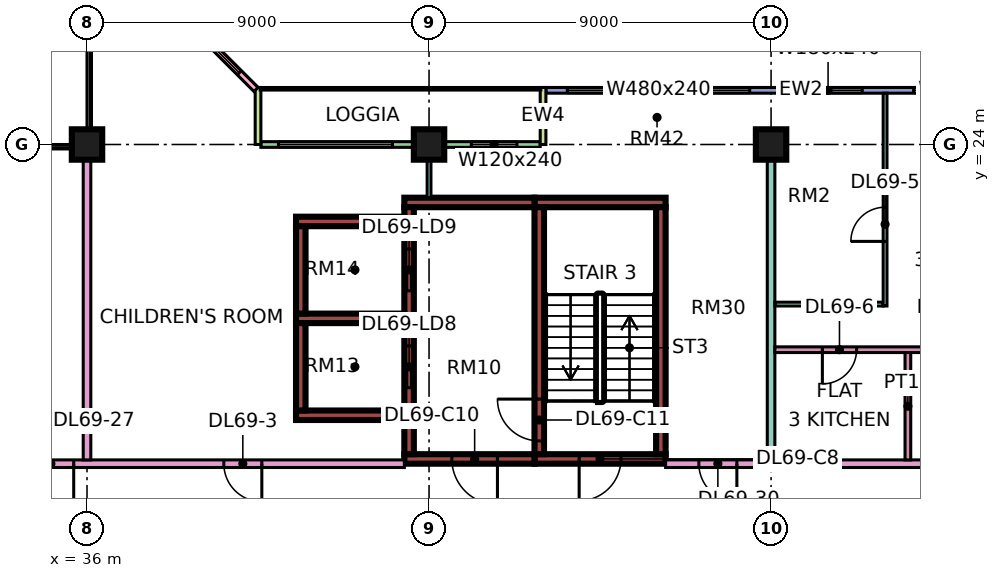
"""IFC4 building model, lengths in metres.
Left out: names, types, materials, properties, quantities, classifications, styles, units other than length and angle.
Written with IfcOpenShell. Run it as: python <this file> out.ifc"""

import sys

from ifc_helpers import new_model, si_unit, direction, frame, frame_2d, origin, origin_2d, place, context, subcontext, project, spatial, rectangle, extrude, element, fill, save


model = new_model("IFC4")
c1 = context("Model", 3, precision=1e-05, world=origin(), true_north=direction((0.0, 1.0)))
c2 = subcontext(c1, "Body", "Model", "MODEL_VIEW")
j1 = project(units=[si_unit("LENGTHUNIT", "METRE"), si_unit("PLANEANGLEUNIT", "RADIAN")], contexts=[c1])
p1 = place(None, origin())
s1 = spatial("IfcSite", under=j1, at=p1, CompositionType="ELEMENT")
p2 = place(p1, origin())
s2 = spatial("IfcBuilding", under=s1, at=p2, CompositionType="ELEMENT")
p3 = place(p2, frame((0.0, 0.0, 295.9)))
s3 = spatial("IfcBuildingStorey", under=s2, at=p3, CompositionType="ELEMENT", Elevation=295.9)
for number, where, z_axis, x_axis in (
    (1, (36.0, 24.0, 0.0), (0.0, 0.0, 1.0), (1.0, 0.0, 0.0)),
    (2, (45.0, 24.0, 0.0), (0.0, 0.0, 1.0), (1.0, 0.0, 0.0)),
    (3, (54.0, 24.0, 0.0), (0.0, 0.0, 1.0), (1.0, 0.0, 0.0)),
):
    element("IfcColumn", number, at=place(p3, frame(where, z_axis=z_axis, x_axis=x_axis)), inside=s3, PredefinedType="COLUMN", context=c2, shape_type="SweptSolid", body=[
        extrude(rectangle(XDim=0.8, YDim=0.8, at=origin_2d()), origin(), (0.0, 0.0, 1.0), 3.75),
    ])
p4 = place(p3, frame((47.775, 15.725, 0.0), z_axis=(0.0, 0.0, 1.0), x_axis=(1.0, 0.0, 0.0)))
e4 = element("IfcWall", 4, at=p4, inside=s3, PredefinedType="SHEAR", context=c2, shape_type="SweptSolid", body=[
    extrude(rectangle(XDim=3.45, YDim=0.25, at=frame_2d((1.725, 0.0))), origin(), (0.0, 0.0, 1.0), 3.75),
])
p5 = place(p4, frame((1.175, 0.0, 0.0)))
e5 = element("IfcOpeningElement", 5, at=p5, cuts=e4, PredefinedType="OPENING", context=c2, shape_type="SweptSolid", body=[
    extrude(rectangle(XDim=1.1, YDim=2.2, at=frame_2d((0.55, 1.1))), frame((0.0, 0.135, 0.0), z_axis=(0.0, -1.0, 0.0), x_axis=(1.0, 0.0, 0.0)), (0.0, 0.0, 1.0), 0.27),
])
p6 = place(p3, frame((47.775, 22.475, 0.0), z_axis=(0.0, 0.0, 1.0), x_axis=(1.0, 0.0, 0.0)))
e6 = element("IfcWall", 6, at=p6, inside=s3, PredefinedType="SHEAR", context=c2, shape_type="SweptSolid", body=[
    extrude(rectangle(XDim=3.45, YDim=0.25, at=frame_2d((1.725, 0.0))), origin(), (0.0, 0.0, 1.0), 3.75),
])
p7 = place(p3, frame((47.9, 15.85, 0.0), z_axis=(0.0, 0.0, 1.0), x_axis=(0.0, 1.0, 0.0)))
e7 = element("IfcWall", 7, at=p7, inside=s3, PredefinedType="SHEAR", context=c2, shape_type="SweptSolid", body=[
    extrude(rectangle(XDim=6.5, YDim=0.25, at=frame_2d((3.25, 0.0))), origin(), (0.0, 0.0, 1.0), 3.75),
])
p8 = place(p7, frame((0.35, 0.0, 0.0)))
e8 = element("IfcOpeningElement", 8, at=p8, cuts=e7, PredefinedType="OPENING", context=c2, shape_type="SweptSolid", body=[
    extrude(rectangle(XDim=1.1, YDim=2.2, at=frame_2d((0.55, 1.1))), frame((0.0, 0.135, 0.0), z_axis=(0.0, -1.0, 0.0), x_axis=(1.0, 0.0, 0.0)), (0.0, 0.0, 1.0), 0.27),
])
p9 = place(p3, frame((51.1, 15.85, 0.0), z_axis=(0.0, 0.0, 1.0), x_axis=(0.0, 1.0, 0.0)))
e9 = element("IfcWall", 9, at=p9, inside=s3, PredefinedType="SHEAR", context=c2, shape_type="SweptSolid", body=[
    extrude(rectangle(XDim=6.5, YDim=0.25, at=frame_2d((3.25, 0.0))), origin(), (0.0, 0.0, 1.0), 3.75),
])
p10 = place(p3, frame((44.35, 15.725, 0.0), z_axis=(0.0, 0.0, 1.0), x_axis=(1.0, 0.0, 0.0)))
e10 = element("IfcWall", 10, at=p10, inside=s3, PredefinedType="SHEAR", context=c2, shape_type="SweptSolid", body=[
    extrude(rectangle(XDim=3.425, YDim=0.25, at=frame_2d((1.712, 0.0))), origin(), (0.0, 0.0, 1.0), 3.75),
])
p11 = place(p10, frame((1.25, 0.0, 0.0)))
e11 = element("IfcOpeningElement", 11, at=p11, cuts=e10, PredefinedType="OPENING", context=c2, shape_type="SweptSolid", body=[
    extrude(rectangle(XDim=1.2, YDim=2.2, at=frame_2d((0.6, 1.1))), frame((0.0, 0.135, 0.0), z_axis=(0.0, -1.0, 0.0), x_axis=(1.0, 0.0, 0.0)), (0.0, 0.0, 1.0), 0.27),
])
p12 = place(p3, frame((44.35, 22.475, 0.0), z_axis=(0.0, 0.0, 1.0), x_axis=(1.0, 0.0, 0.0)))
e12 = element("IfcWall", 12, at=p12, inside=s3, PredefinedType="SHEAR", context=c2, shape_type="SweptSolid", body=[
    extrude(rectangle(XDim=3.425, YDim=0.25, at=frame_2d((1.712, 0.0))), origin(), (0.0, 0.0, 1.0), 3.75),
])
p13 = place(p3, frame((44.475, 15.85, 0.0), z_axis=(0.0, 0.0, 1.0), x_axis=(0.0, 1.0, 0.0)))
e13 = element("IfcWall", 13, at=p13, inside=s3, PredefinedType="SHEAR", context=c2, shape_type="SweptSolid", body=[
    extrude(rectangle(XDim=6.5, YDim=0.25, at=frame_2d((3.25, 0.0))), origin(), (0.0, 0.0, 1.0), 3.75),
])
p14 = place(p13, frame((1.75, 0.0, 0.0)))
e14 = element("IfcOpeningElement", 14, at=p14, cuts=e13, PredefinedType="OPENING", context=c2, shape_type="SweptSolid", body=[
    extrude(rectangle(XDim=1.1, YDim=2.2, at=frame_2d((0.55, 1.1))), frame((0.0, 0.135, 0.0), z_axis=(0.0, -1.0, 0.0), x_axis=(1.0, 0.0, 0.0)), (0.0, 0.0, 1.0), 0.27),
])
p15 = place(p13, frame((4.3, 0.0, 0.0)))
e15 = element("IfcOpeningElement", 15, at=p15, cuts=e13, PredefinedType="OPENING", context=c2, shape_type="SweptSolid", body=[
    extrude(rectangle(XDim=1.1, YDim=2.2, at=frame_2d((0.55, 1.1))), frame((0.0, 0.135, 0.0), z_axis=(0.0, -1.0, 0.0), x_axis=(1.0, 0.0, 0.0)), (0.0, 0.0, 1.0), 0.27),
])
for number, where, z_axis, x_axis in (
    (16, (41.5, 16.875, 0.0), (0.0, 0.0, 1.0), (1.0, 0.0, 0.0)),
    (17, (41.5, 19.425, 0.0), (0.0, 0.0, 1.0), (1.0, 0.0, 0.0)),
    (18, (41.5, 21.975, 0.0), (0.0, 0.0, 1.0), (1.0, 0.0, 0.0)),
):
    element("IfcWall", number, at=place(p3, frame(where, z_axis=z_axis, x_axis=x_axis)), inside=s3, PredefinedType="SHEAR", context=c2, shape_type="SweptSolid", body=[
        extrude(rectangle(XDim=2.85, YDim=0.25, at=frame_2d((1.425, 0.0))), origin(), (0.0, 0.0, 1.0), 3.75),
    ])
for number, where, z_axis, x_axis in (
    (19, (41.625, 17.0, 0.0), (0.0, 0.0, 1.0), (0.0, 1.0, 0.0)),
    (20, (41.625, 19.55, 0.0), (0.0, 0.0, 1.0), (0.0, 1.0, 0.0)),
):
    element("IfcWall", number, at=place(p3, frame(where, z_axis=z_axis, x_axis=x_axis)), inside=s3, PredefinedType="SHEAR", context=c2, shape_type="SweptSolid", body=[
        extrude(rectangle(XDim=2.3, YDim=0.25, at=frame_2d((1.15, 0.0))), origin(), (0.0, 0.0, 1.0), 3.75),
    ])
p16 = place(p3, frame((61.5, 25.425, 0.0), z_axis=(0.0, 0.0, 1.0), x_axis=(-1.0, 0.0, 0.0)))
e21 = element("IfcWall", 21, at=p16, inside=s3, PredefinedType="SOLIDWALL", context=c2, shape_type="SweptSolid", body=[
    extrude(rectangle(XDim=13.425, YDim=0.15, at=frame_2d((6.712, 0.0))), origin(), (0.0, 0.0, 1.0), 3.35),
])
p17 = place(p16, frame((0.75, 0.0, 0.45)))
e22 = element("IfcOpeningElement", 22, at=p17, cuts=e21, PredefinedType="OPENING", context=c2, shape_type="SweptSolid", body=[
    extrude(rectangle(XDim=3.0, YDim=2.4, at=frame_2d((1.5, 1.2))), frame((0.0, 0.085, 0.0), z_axis=(0.0, -1.0, 0.0), x_axis=(1.0, 0.0, 0.0)), (0.0, 0.0, 1.0), 0.17),
])
p18 = place(p16, frame((5.1, 0.0, 0.45)))
e23 = element("IfcOpeningElement", 23, at=p18, cuts=e21, PredefinedType="OPENING", context=c2, shape_type="SweptSolid", body=[
    extrude(rectangle(XDim=1.8, YDim=2.4, at=frame_2d((0.9, 1.2))), frame((0.0, 0.085, 0.0), z_axis=(0.0, -1.0, 0.0), x_axis=(1.0, 0.0, 0.0)), (0.0, 0.0, 1.0), 0.17),
])
p19 = place(p16, frame((8.062, 0.0, 0.45)))
e24 = element("IfcOpeningElement", 24, at=p19, cuts=e21, PredefinedType="OPENING", context=c2, shape_type="SweptSolid", body=[
    extrude(rectangle(XDim=4.8, YDim=2.4, at=frame_2d((2.4, 1.2))), frame((0.0, 0.085, 0.0), z_axis=(0.0, -1.0, 0.0), x_axis=(1.0, 0.0, 0.0)), (0.0, 0.0, 1.0), 0.17),
])
p20 = place(p3, frame((47.925, 24.0, 0.0), z_axis=(0.0, 0.0, 1.0), x_axis=(-1.0, 0.0, 0.0)))
e25 = element("IfcWall", 25, at=p20, inside=s3, PredefinedType="SOLIDWALL", context=c2, shape_type="SweptSolid", body=[
    extrude(rectangle(XDim=7.35, YDim=0.15, at=frame_2d((3.675, 0.0))), origin(), (0.0, 0.0, 1.0), 3.35),
])
p21 = place(p20, frame((0.613, 0.0, 0.45)))
e26 = element("IfcOpeningElement", 26, at=p21, cuts=e25, PredefinedType="OPENING", context=c2, shape_type="SweptSolid", body=[
    extrude(rectangle(XDim=1.2, YDim=2.4, at=frame_2d((0.6, 1.2))), frame((0.0, 0.085, 0.0), z_axis=(0.0, -1.0, 0.0), x_axis=(1.0, 0.0, 0.0)), (0.0, 0.0, 1.0), 0.17),
])
p22 = place(p20, frame((3.887, 0.0, 0.45)))
e27 = element("IfcOpeningElement", 27, at=p22, cuts=e25, PredefinedType="OPENING", context=c2, shape_type="SweptSolid", body=[
    extrude(rectangle(XDim=3.0, YDim=2.4, at=frame_2d((1.5, 1.2))), frame((0.0, 0.085, 0.0), z_axis=(0.0, -1.0, 0.0), x_axis=(1.0, 0.0, 0.0)), (0.0, 0.0, 1.0), 0.17),
])
for number, where, z_axis, x_axis in (
    (28, (48.0, 25.5, 0.0), (0.0, 0.0, 1.0), (0.0, -1.0, 0.0)),
    (29, (40.5, 25.5, 0.0), (0.0, 0.0, 1.0), (0.0, -1.0, 0.0)),
):
    element("IfcWall", number, at=place(p3, frame(where, z_axis=z_axis, x_axis=x_axis)), inside=s3, PredefinedType="SOLIDWALL", context=c2, shape_type="SweptSolid", body=[
        extrude(rectangle(XDim=1.5, YDim=0.15, at=frame_2d((0.75, 0.0))), origin(), (0.0, 0.0, 1.0), 3.35),
    ])
p23 = place(p3, frame((40.447, 25.447, 0.0), z_axis=(0.0, 0.0, 1.0), x_axis=(-0.707106781187, 0.707106781187, 0.0)))
e30 = element("IfcWall", 30, at=p23, inside=s3, PredefinedType="SOLIDWALL", context=c2, shape_type="SweptSolid", body=[
    extrude(rectangle(XDim=4.243, YDim=0.15, at=frame_2d((2.121, 0.0))), origin(), (0.0, 0.0, 1.0), 3.35),
])
p24 = place(p23, frame((0.621, 0.0, 0.45)))
e31 = element("IfcOpeningElement", 31, at=p24, cuts=e30, PredefinedType="OPENING", context=c2, shape_type="SweptSolid", body=[
    extrude(rectangle(XDim=3.0, YDim=2.4, at=frame_2d((1.5, 1.2))), frame((0.0, 0.085, 0.0), z_axis=(0.0, -1.0, 0.0), x_axis=(1.0, 0.0, 0.0)), (0.0, 0.0, 1.0), 0.17),
])
p25 = place(p3, frame((34.0, 15.6, 0.0), z_axis=(0.0, 0.0, 1.0), x_axis=(1.0, 0.0, 0.0)))
e32 = element("IfcWall", 32, at=p25, inside=s3, PredefinedType="PARTITIONING", context=c2, shape_type="SweptSolid", body=[
    extrude(rectangle(XDim=10.35, YDim=0.2, at=frame_2d((5.175, 0.0))), origin(), (0.0, 0.0, 1.0), 3.35),
])
p26 = place(p25, frame((5.6, 0.0, 0.0)))
e33 = element("IfcOpeningElement", 33, at=p26, cuts=e32, PredefinedType="OPENING", context=c2, shape_type="SweptSolid", body=[
    extrude(rectangle(XDim=1.0, YDim=2.1, at=frame_2d((0.5, 1.05))), frame((0.0, 0.11, 0.0), z_axis=(0.0, -1.0, 0.0), x_axis=(1.0, 0.0, 0.0)), (0.0, 0.0, 1.0), 0.22),
])
p27 = place(p25, frame((0.45, 0.0, 0.0)))
e34 = element("IfcOpeningElement", 34, at=p27, cuts=e32, PredefinedType="OPENING", context=c2, shape_type="SweptSolid", body=[
    extrude(rectangle(XDim=1.2, YDim=2.1, at=frame_2d((0.6, 1.05))), frame((0.0, 0.11, 0.0), z_axis=(0.0, -1.0, 0.0), x_axis=(1.0, 0.0, 0.0)), (0.0, 0.0, 1.0), 0.22),
])
p28 = place(p3, frame((36.0, 15.7, 0.0), z_axis=(0.0, 0.0, 1.0), x_axis=(0.0, 1.0, 0.0)))
e35 = element("IfcWall", 35, at=p28, inside=s3, PredefinedType="PARTITIONING", context=c2, shape_type="SweptSolid", body=[
    extrude(rectangle(XDim=8.3, YDim=0.2, at=frame_2d((4.15, 0.0))), origin(), (0.0, 0.0, 1.0), 3.35),
])
p29 = place(p3, frame((45.0, 22.6, 0.0), z_axis=(0.0, 0.0, 1.0), x_axis=(0.0, 1.0, 0.0)))
e36 = element("IfcWall", 36, at=p29, inside=s3, PredefinedType="PARTITIONING", context=c2, shape_type="SweptSolid", body=[
    extrude(rectangle(XDim=1.326, YDim=0.1, at=frame_2d((0.663, 0.0))), origin(), (0.0, 0.0, 1.0), 3.35),
])
p30 = place(p3, frame((51.225, 15.6, 0.0), z_axis=(0.0, 0.0, 1.0), x_axis=(1.0, 0.0, 0.0)))
e37 = element("IfcWall", 37, at=p30, inside=s3, PredefinedType="PARTITIONING", context=c2, shape_type="SweptSolid", body=[
    extrude(rectangle(XDim=11.701, YDim=0.2, at=frame_2d((5.851, 0.0))), origin(), (0.0, 0.0, 1.0), 3.35),
])
p31 = place(p30, frame((9.725, 0.0, 0.0)))
e38 = element("IfcOpeningElement", 38, at=p31, cuts=e37, PredefinedType="OPENING", context=c2, shape_type="SweptSolid", body=[
    extrude(rectangle(XDim=1.0, YDim=2.1, at=frame_2d((0.5, 1.05))), frame((0.0, 0.11, 0.0), z_axis=(0.0, -1.0, 0.0), x_axis=(1.0, 0.0, 0.0)), (0.0, 0.0, 1.0), 0.22),
])
p32 = place(p30, frame((0.875, 0.0, 0.0)))
e39 = element("IfcOpeningElement", 39, at=p32, cuts=e37, PredefinedType="OPENING", context=c2, shape_type="SweptSolid", body=[
    extrude(rectangle(XDim=1.0, YDim=2.1, at=frame_2d((0.5, 1.05))), frame((0.0, 0.11, 0.0), z_axis=(0.0, -1.0, 0.0), x_axis=(1.0, 0.0, 0.0)), (0.0, 0.0, 1.0), 0.22),
])
p33 = place(p3, frame((54.0, 15.7, 0.0), z_axis=(0.0, 0.0, 1.0), x_axis=(0.0, 1.0, 0.0)))
e40 = element("IfcWall", 40, at=p33, inside=s3, PredefinedType="PARTITIONING", context=c2, shape_type="SweptSolid", body=[
    extrude(rectangle(XDim=8.3, YDim=0.2, at=frame_2d((4.15, 0.0))), origin(), (0.0, 0.0, 1.0), 3.35),
])
p34 = place(p3, frame((54.1, 18.6, 0.0), z_axis=(0.0, 0.0, 1.0), x_axis=(1.0, 0.0, 0.0)))
e41 = element("IfcWall", 41, at=p34, inside=s3, PredefinedType="PARTITIONING", context=c2, shape_type="SweptSolid", body=[
    extrude(rectangle(XDim=5.975, YDim=0.15, at=frame_2d((2.987, 0.0))), origin(), (0.0, 0.0, 1.0), 3.35),
])
p35 = place(p34, frame((4.25, 0.0, 0.0)))
e42 = element("IfcOpeningElement", 42, at=p35, cuts=e41, PredefinedType="OPENING", context=c2, shape_type="SweptSolid", body=[
    extrude(rectangle(XDim=0.8, YDim=2.1, at=frame_2d((0.4, 1.05))), frame((0.0, 0.085, 0.0), z_axis=(0.0, -1.0, 0.0), x_axis=(1.0, 0.0, 0.0)), (0.0, 0.0, 1.0), 0.17),
])
p36 = place(p34, frame((1.25, 0.0, 0.0)))
e43 = element("IfcOpeningElement", 43, at=p36, cuts=e41, PredefinedType="OPENING", context=c2, shape_type="SweptSolid", body=[
    extrude(rectangle(XDim=0.9, YDim=2.1, at=frame_2d((0.45, 1.05))), frame((0.0, 0.085, 0.0), z_axis=(0.0, -1.0, 0.0), x_axis=(1.0, 0.0, 0.0)), (0.0, 0.0, 1.0), 0.17),
])
p37 = place(p3, frame((54.1, 19.8, 0.0), z_axis=(0.0, 0.0, 1.0), x_axis=(1.0, 0.0, 0.0)))
e44 = element("IfcWall", 44, at=p37, inside=s3, PredefinedType="PARTITIONING", context=c2, shape_type="SweptSolid", body=[
    extrude(rectangle(XDim=2.85, YDim=0.1, at=frame_2d((1.425, 0.0))), origin(), (0.0, 0.0, 1.0), 3.35),
])
p38 = place(p3, frame((57.0, 19.75, 0.0), z_axis=(0.0, 0.0, 1.0), x_axis=(0.0, 1.0, 0.0)))
e45 = element("IfcWall", 45, at=p38, inside=s3, PredefinedType="PARTITIONING", context=c2, shape_type="SweptSolid", body=[
    extrude(rectangle(XDim=5.6, YDim=0.1, at=frame_2d((2.8, 0.0))), origin(), (0.0, 0.0, 1.0), 3.35),
])
p39 = place(p38, frame((1.7, 0.0, 0.0)))
e46 = element("IfcOpeningElement", 46, at=p39, cuts=e45, PredefinedType="OPENING", context=c2, shape_type="SweptSolid", body=[
    extrude(rectangle(XDim=0.9, YDim=2.1, at=frame_2d((0.45, 1.05))), frame((0.0, 0.06, 0.0), z_axis=(0.0, -1.0, 0.0), x_axis=(1.0, 0.0, 0.0)), (0.0, 0.0, 1.0), 0.12),
])
p40 = place(p3, frame((57.6, 15.7, 0.0), z_axis=(0.0, 0.0, 1.0), x_axis=(0.0, 1.0, 0.0)))
e47 = element("IfcWall", 47, at=p40, inside=s3, PredefinedType="PARTITIONING", context=c2, shape_type="SweptSolid", body=[
    extrude(rectangle(XDim=2.825, YDim=0.15, at=frame_2d((1.413, 0.0))), origin(), (0.0, 0.0, 1.0), 3.35),
])
p41 = place(p17, origin())
e48 = element("IfcWindow", 48, at=p41, inside=s3, PartitioningType="SINGLE_PANEL", PredefinedType="WINDOW", context=c2, shape_type="SweptSolid", body=[
    extrude(rectangle(XDim=3.0, YDim=2.4, at=frame_2d((1.5, 1.2))), frame((0.0, 0.03, 0.0), z_axis=(0.0, -1.0, 0.0), x_axis=(1.0, 0.0, 0.0)), (0.0, 0.0, 1.0), 0.06),
])
fill(e22, e48)
p42 = place(p18, origin())
e49 = element("IfcWindow", 49, at=p42, inside=s3, PartitioningType="SINGLE_PANEL", PredefinedType="WINDOW", context=c2, shape_type="SweptSolid", body=[
    extrude(rectangle(XDim=1.8, YDim=2.4, at=frame_2d((0.9, 1.2))), frame((0.0, 0.03, 0.0), z_axis=(0.0, -1.0, 0.0), x_axis=(1.0, 0.0, 0.0)), (0.0, 0.0, 1.0), 0.06),
])
fill(e23, e49)
p43 = place(p19, origin())
e50 = element("IfcWindow", 50, at=p43, inside=s3, PartitioningType="SINGLE_PANEL", PredefinedType="WINDOW", context=c2, shape_type="SweptSolid", body=[
    extrude(rectangle(XDim=4.8, YDim=2.4, at=frame_2d((2.4, 1.2))), frame((0.0, 0.03, 0.0), z_axis=(0.0, -1.0, 0.0), x_axis=(1.0, 0.0, 0.0)), (0.0, 0.0, 1.0), 0.06),
])
fill(e24, e50)
p44 = place(p21, origin())
e51 = element("IfcWindow", 51, at=p44, inside=s3, PartitioningType="SINGLE_PANEL", PredefinedType="WINDOW", context=c2, shape_type="SweptSolid", body=[
    extrude(rectangle(XDim=1.2, YDim=2.4, at=frame_2d((0.6, 1.2))), frame((0.0, 0.03, 0.0), z_axis=(0.0, -1.0, 0.0), x_axis=(1.0, 0.0, 0.0)), (0.0, 0.0, 1.0), 0.06),
])
fill(e26, e51)
p45 = place(p22, origin())
e52 = element("IfcWindow", 52, at=p45, inside=s3, PartitioningType="SINGLE_PANEL", PredefinedType="WINDOW", context=c2, shape_type="SweptSolid", body=[
    extrude(rectangle(XDim=3.0, YDim=2.4, at=frame_2d((1.5, 1.2))), frame((0.0, 0.03, 0.0), z_axis=(0.0, -1.0, 0.0), x_axis=(1.0, 0.0, 0.0)), (0.0, 0.0, 1.0), 0.06),
])
fill(e27, e52)
p46 = place(p24, origin())
e53 = element("IfcWindow", 53, at=p46, inside=s3, PartitioningType="SINGLE_PANEL", PredefinedType="WINDOW", context=c2, shape_type="SweptSolid", body=[
    extrude(rectangle(XDim=3.0, YDim=2.4, at=frame_2d((1.5, 1.2))), frame((0.0, 0.03, 0.0), z_axis=(0.0, -1.0, 0.0), x_axis=(1.0, 0.0, 0.0)), (0.0, 0.0, 1.0), 0.06),
])
fill(e31, e53)
p47 = place(p5, frame((1.1, 0.0, 0.0), z_axis=(0.0, 0.0, 1.0), x_axis=(-1.0, 0.0, 0.0)))
e54 = element("IfcDoor", 54, at=p47, inside=s3, OperationType="SINGLE_SWING_LEFT", PredefinedType="DOOR", context=c2, shape_type="SweptSolid", body=[
    extrude(rectangle(XDim=1.1, YDim=2.2, at=frame_2d((0.55, 1.1))), frame((0.0, 0.025, 0.0), z_axis=(0.0, -1.0, 0.0), x_axis=(1.0, 0.0, 0.0)), (0.0, 0.0, 1.0), 0.05),
])
fill(e5, e54)
p48 = place(p11, origin())
e55 = element("IfcDoor", 55, at=p48, inside=s3, OperationType="SINGLE_SWING_RIGHT", PredefinedType="DOOR", context=c2, shape_type="SweptSolid", body=[
    extrude(rectangle(XDim=1.2, YDim=2.2, at=frame_2d((0.6, 1.1))), frame((0.0, 0.025, 0.0), z_axis=(0.0, -1.0, 0.0), x_axis=(1.0, 0.0, 0.0)), (0.0, 0.0, 1.0), 0.05),
])
fill(e11, e55)
p49 = place(p8, frame((1.1, 0.0, 0.0), z_axis=(0.0, 0.0, 1.0), x_axis=(-1.0, 0.0, 0.0)))
e56 = element("IfcDoor", 56, at=p49, inside=s3, OperationType="SINGLE_SWING_RIGHT", PredefinedType="DOOR", context=c2, shape_type="SweptSolid", body=[
    extrude(rectangle(XDim=1.1, YDim=2.2, at=frame_2d((0.55, 1.1))), frame((0.0, 0.025, 0.0), z_axis=(0.0, -1.0, 0.0), x_axis=(1.0, 0.0, 0.0)), (0.0, 0.0, 1.0), 0.05),
])
fill(e8, e56)
p50 = place(p14, origin())
e57 = element("IfcDoor", 57, at=p50, inside=s3, OperationType="DOUBLE_DOOR_SLIDING", PredefinedType="DOOR", context=c2, shape_type="SweptSolid", body=[
    extrude(rectangle(XDim=1.1, YDim=2.2, at=frame_2d((0.55, 1.1))), frame((0.0, 0.025, 0.0), z_axis=(0.0, -1.0, 0.0), x_axis=(1.0, 0.0, 0.0)), (0.0, 0.0, 1.0), 0.05),
])
fill(e14, e57)
p51 = place(p15, origin())
e58 = element("IfcDoor", 58, at=p51, inside=s3, OperationType="DOUBLE_DOOR_SLIDING", PredefinedType="DOOR", context=c2, shape_type="SweptSolid", body=[
    extrude(rectangle(XDim=1.1, YDim=2.2, at=frame_2d((0.55, 1.1))), frame((0.0, 0.025, 0.0), z_axis=(0.0, -1.0, 0.0), x_axis=(1.0, 0.0, 0.0)), (0.0, 0.0, 1.0), 0.05),
])
fill(e15, e58)
p52 = place(p26, origin())
e59 = element("IfcDoor", 59, at=p52, inside=s3, OperationType="SINGLE_SWING_RIGHT", PredefinedType="DOOR", context=c2, shape_type="SweptSolid", body=[
    extrude(rectangle(XDim=1.0, YDim=2.1, at=frame_2d((0.5, 1.05))), frame((0.0, 0.025, 0.0), z_axis=(0.0, -1.0, 0.0), x_axis=(1.0, 0.0, 0.0)), (0.0, 0.0, 1.0), 0.05),
])
fill(e33, e59)
p53 = place(p39, origin())
e60 = element("IfcDoor", 60, at=p53, inside=s3, OperationType="SINGLE_SWING_LEFT", PredefinedType="DOOR", context=c2, shape_type="SweptSolid", body=[
    extrude(rectangle(XDim=0.9, YDim=2.1, at=frame_2d((0.45, 1.05))), frame((0.0, 0.025, 0.0), z_axis=(0.0, -1.0, 0.0), x_axis=(1.0, 0.0, 0.0)), (0.0, 0.0, 1.0), 0.05),
])
fill(e46, e60)
p54 = place(p36, frame((0.9, 0.0, 0.0), z_axis=(0.0, 0.0, 1.0), x_axis=(-1.0, 0.0, 0.0)))
e61 = element("IfcDoor", 61, at=p54, inside=s3, OperationType="SINGLE_SWING_LEFT", PredefinedType="DOOR", context=c2, shape_type="SweptSolid", body=[
    extrude(rectangle(XDim=0.9, YDim=2.1, at=frame_2d((0.45, 1.05))), frame((0.0, 0.025, 0.0), z_axis=(0.0, -1.0, 0.0), x_axis=(1.0, 0.0, 0.0)), (0.0, 0.0, 1.0), 0.05),
])
fill(e43, e61)
p55 = place(p27, origin())
e62 = element("IfcDoor", 62, at=p55, inside=s3, OperationType="SINGLE_SWING_RIGHT", PredefinedType="DOOR", context=c2, shape_type="SweptSolid", body=[
    extrude(rectangle(XDim=1.2, YDim=2.1, at=frame_2d((0.6, 1.05))), frame((0.0, 0.025, 0.0), z_axis=(0.0, -1.0, 0.0), x_axis=(1.0, 0.0, 0.0)), (0.0, 0.0, 1.0), 0.05),
])
fill(e34, e62)
p56 = place(p32, origin())
e63 = element("IfcDoor", 63, at=p56, inside=s3, OperationType="SINGLE_SWING_RIGHT", PredefinedType="DOOR", context=c2, shape_type="SweptSolid", body=[
    extrude(rectangle(XDim=1.0, YDim=2.1, at=frame_2d((0.5, 1.05))), frame((0.0, 0.025, 0.0), z_axis=(0.0, -1.0, 0.0), x_axis=(1.0, 0.0, 0.0)), (0.0, 0.0, 1.0), 0.05),
])
fill(e39, e63)
save(model, sys.argv[1])
